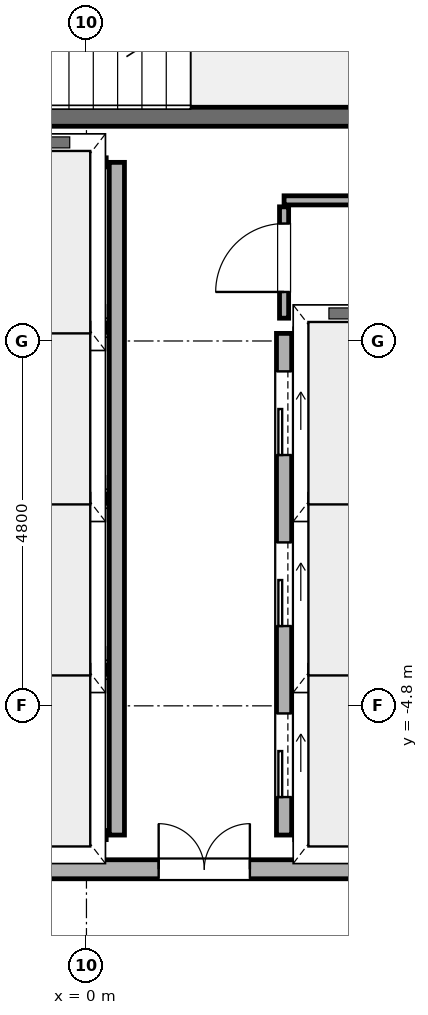
"""IFC4 building model, lengths in metres.
Left out: names, types, materials, properties, quantities, classifications, styles, units other than length and angle.
Written with IfcOpenShell. Run it as: python <this file> out.ifc"""

import sys

from ifc_helpers import new_model, si_unit, direction, frame, frame_2d, origin, place, context, subcontext, project, spatial, rectangle, extrude, element, fill, save


model = new_model("IFC4")
c1 = context("Model", 3, precision=1e-05, world=origin(), true_north=direction((0.0, 1.0)))
c2 = subcontext(c1, "Body", "Model", "MODEL_VIEW")
j1 = project(units=[si_unit("LENGTHUNIT", "METRE"), si_unit("PLANEANGLEUNIT", "RADIAN")], contexts=[c1])
p1 = place(None, origin())
s1 = spatial("IfcSite", under=j1, at=p1, CompositionType="ELEMENT")
p2 = place(p1, origin())
s2 = spatial("IfcBuilding", under=s1, at=p2, CompositionType="ELEMENT")
p3 = place(p2, frame((0.0, 0.0, 180.3)))
s3 = spatial("IfcBuildingStorey", under=s2, at=p3, CompositionType="ELEMENT", Elevation=180.3)
p4 = place(p3, frame((-4.6, -6.95, 0.0), z_axis=(0.0, 0.0, 1.0), x_axis=(1.0, 0.0, 0.0)))
e1 = element("IfcWall", 1, at=p4, inside=s3, PredefinedType="SOLIDWALL", context=c2, shape_type="SweptSolid", body=[
    extrude(rectangle(XDim=9.2, YDim=0.25, at=frame_2d((4.6, 0.0))), origin(), (0.0, 0.0, 1.0), 3.75),
])
p5 = place(p4, frame((0.8, 0.0, 0.0)))
e2 = element("IfcOpeningElement", 2, at=p5, cuts=e1, PredefinedType="OPENING", context=c2, shape_type="SweptSolid", body=[
    extrude(rectangle(XDim=1.2, YDim=2.2, at=frame_2d((0.6, 1.1))), frame((0.0, 0.14, 0.0), z_axis=(0.0, -1.0, 0.0), x_axis=(1.0, 0.0, 0.0)), (0.0, 0.0, 1.0), 0.28),
])
p6 = place(p4, frame((5.55, 0.0, 0.0)))
e3 = element("IfcOpeningElement", 3, at=p6, cuts=e1, PredefinedType="OPENING", context=c2, shape_type="SweptSolid", body=[
    extrude(rectangle(XDim=1.2, YDim=2.2, at=frame_2d((0.6, 1.1))), frame((0.0, 0.14, 0.0), z_axis=(0.0, -1.0, 0.0), x_axis=(1.0, 0.0, 0.0)), (0.0, 0.0, 1.0), 0.28),
])
p7 = place(p3, frame((-4.65, 2.95, -0.22), z_axis=(0.0, 0.0, 1.0), x_axis=(1.0, 0.0, 0.0)))
e4 = element("IfcWall", 4, at=p7, inside=s3, PredefinedType="SOLIDWALL", context=c2, shape_type="SweptSolid", body=[
    extrude(rectangle(XDim=9.9, YDim=0.25, at=frame_2d((4.95, 0.0))), origin(), (0.0, 0.0, 1.0), 5.17),
])
p8 = place(p7, frame((0.65, 0.0, 0.22)))
e5 = element("IfcOpeningElement", 5, at=p8, cuts=e4, PredefinedType="OPENING", context=c2, shape_type="SweptSolid", body=[
    extrude(rectangle(XDim=0.95, YDim=2.15, at=frame_2d((0.475, 1.075))), frame((0.0, 0.14, 0.0), z_axis=(0.0, -1.0, 0.0), x_axis=(1.0, 0.0, 0.0)), (0.0, 0.0, 1.0), 0.28),
])
p9 = place(p3, frame((0.4, -6.5, 0.0), z_axis=(0.0, 0.0, 1.0), x_axis=(0.0, 1.0, 0.0)))
e6 = element("IfcWall", 6, at=p9, inside=s3, PredefinedType="SOLIDWALL", context=c2, shape_type="SweptSolid", body=[
    extrude(rectangle(XDim=8.85, YDim=0.2, at=frame_2d((4.425, 0.0))), origin(), (0.0, 0.0, 1.0), 4.95),
])
for number, where, z_axis, x_axis in (
    (7, (-1.96, -6.5, 0.0), (0.0, 0.0, 1.0), (1.0, 0.0, 0.0)),
    (8, (-1.96, -4.325, 0.0), (0.0, 0.0, 1.0), (1.0, 0.0, 0.0)),
    (9, (-1.96, -2.075, 0.0), (0.0, 0.0, 1.0), (1.0, 0.0, 0.0)),
    (10, (-1.96, 0.175, 0.0), (0.0, 0.0, 1.0), (1.0, 0.0, 0.0)),
    (11, (-1.96, 2.35, 0.0), (0.0, 0.0, 1.0), (1.0, 0.0, 0.0)),
):
    element("IfcWall", number, at=place(p3, frame(where, z_axis=z_axis, x_axis=x_axis)), inside=s3, PredefinedType="PARTITIONING", context=c2, shape_type="SweptSolid", body=[
        extrude(rectangle(XDim=2.22, YDim=0.12, at=frame_2d((1.11, 0.0))), origin(), (0.0, 0.0, 1.0), 4.95),
    ])
p10 = place(p3, frame((2.6, -6.5, 0.0), z_axis=(0.0, 0.0, 1.0), x_axis=(0.0, 1.0, 0.0)))
e12 = element("IfcWall", 12, at=p10, inside=s3, PredefinedType="SOLIDWALL", context=c2, shape_type="SweptSolid", body=[
    extrude(rectangle(XDim=6.6, YDim=0.2, at=frame_2d((3.3, 0.0))), origin(), (0.0, 0.0, 1.0), 4.95),
])
p11 = place(p10, frame((0.5, 0.0, 0.0)))
e13 = element("IfcOpeningElement", 13, at=p11, cuts=e12, PredefinedType="OPENING", context=c2, shape_type="SweptSolid", body=[
    extrude(rectangle(XDim=1.1, YDim=2.2, at=frame_2d((0.55, 1.1))), frame((0.0, 0.115, 0.0), z_axis=(0.0, -1.0, 0.0), x_axis=(1.0, 0.0, 0.0)), (0.0, 0.0, 1.0), 0.23),
])
p12 = place(p10, frame((2.75, 0.0, 0.0)))
e14 = element("IfcOpeningElement", 14, at=p12, cuts=e12, PredefinedType="OPENING", context=c2, shape_type="SweptSolid", body=[
    extrude(rectangle(XDim=1.1, YDim=2.2, at=frame_2d((0.55, 1.1))), frame((0.0, 0.115, 0.0), z_axis=(0.0, -1.0, 0.0), x_axis=(1.0, 0.0, 0.0)), (0.0, 0.0, 1.0), 0.23),
])
p13 = place(p10, frame((5.0, 0.0, 0.0)))
e15 = element("IfcOpeningElement", 15, at=p13, cuts=e12, PredefinedType="OPENING", context=c2, shape_type="SweptSolid", body=[
    extrude(rectangle(XDim=1.1, YDim=2.2, at=frame_2d((0.55, 1.1))), frame((0.0, 0.115, 0.0), z_axis=(0.0, -1.0, 0.0), x_axis=(1.0, 0.0, 0.0)), (0.0, 0.0, 1.0), 0.23),
])
for number, where, z_axis, x_axis in (
    (16, (2.74, -6.5, 0.0), (0.0, 0.0, 1.0), (1.0, 0.0, 0.0)),
    (17, (2.74, -4.325, 0.0), (0.0, 0.0, 1.0), (1.0, 0.0, 0.0)),
    (18, (2.74, -2.075, 0.0), (0.0, 0.0, 1.0), (1.0, 0.0, 0.0)),
    (19, (2.74, 0.1, 0.0), (0.0, 0.0, 1.0), (1.0, 0.0, 0.0)),
):
    element("IfcWall", number, at=place(p3, frame(where, z_axis=z_axis, x_axis=x_axis)), inside=s3, PredefinedType="PARTITIONING", context=c2, shape_type="SweptSolid", body=[
        extrude(rectangle(XDim=2.17, YDim=0.12, at=frame_2d((1.085, 0.0))), origin(), (0.0, 0.0, 1.0), 4.95),
    ])
p14 = place(p3, frame((2.6, 1.85, 0.0), z_axis=(0.0, 0.0, 1.0), x_axis=(1.0, 0.0, 0.0)))
e20 = element("IfcWall", 20, at=p14, inside=s3, PredefinedType="PARTITIONING", context=c2, shape_type="SweptSolid", body=[
    extrude(rectangle(XDim=2.45, YDim=0.12, at=frame_2d((1.225, 0.0))), origin(), (0.0, 0.0, 1.0), 4.95),
])
p15 = place(p3, frame((2.6, 0.3, 0.0), z_axis=(0.0, 0.0, 1.0), x_axis=(0.0, 1.0, 0.0)))
e21 = element("IfcWall", 21, at=p15, inside=s3, PredefinedType="PARTITIONING", context=c2, shape_type="SweptSolid", body=[
    extrude(rectangle(XDim=1.465, YDim=0.12, at=frame_2d((0.732, 0.0))), origin(), (0.0, 0.0, 1.0), 4.95),
])
p16 = place(p15, frame((0.345, 0.0, 0.0)))
e22 = element("IfcOpeningElement", 22, at=p16, cuts=e21, PredefinedType="OPENING", context=c2, shape_type="SweptSolid", body=[
    extrude(rectangle(XDim=0.9, YDim=2.1, at=frame_2d((0.45, 1.05))), frame((0.0, 0.075, 0.0), z_axis=(0.0, -1.0, 0.0), x_axis=(1.0, 0.0, 0.0)), (0.0, 0.0, 1.0), 0.15),
])
p17 = place(p6, origin())
e23 = element("IfcDoor", 23, at=p17, inside=s3, OperationType="DOUBLE_DOOR_SINGLE_SWING", PredefinedType="DOOR", context=c2, shape_type="SweptSolid", body=[
    extrude(rectangle(XDim=1.2, YDim=2.2, at=frame_2d((0.6, 1.1))), frame((0.0, 0.025, 0.0), z_axis=(0.0, -1.0, 0.0), x_axis=(1.0, 0.0, 0.0)), (0.0, 0.0, 1.0), 0.05),
])
fill(e3, e23)
p18 = place(p11, origin())
e24 = element("IfcDoor", 24, at=p18, inside=s3, OperationType="SLIDING_TO_LEFT", PredefinedType="DOOR", context=c2, shape_type="SweptSolid", body=[
    extrude(rectangle(XDim=1.1, YDim=2.2, at=frame_2d((0.55, 1.1))), frame((0.0, 0.025, 0.0), z_axis=(0.0, -1.0, 0.0), x_axis=(1.0, 0.0, 0.0)), (0.0, 0.0, 1.0), 0.05),
])
fill(e13, e24)
p19 = place(p12, origin())
e25 = element("IfcDoor", 25, at=p19, inside=s3, OperationType="SLIDING_TO_LEFT", PredefinedType="DOOR", context=c2, shape_type="SweptSolid", body=[
    extrude(rectangle(XDim=1.1, YDim=2.2, at=frame_2d((0.55, 1.1))), frame((0.0, 0.025, 0.0), z_axis=(0.0, -1.0, 0.0), x_axis=(1.0, 0.0, 0.0)), (0.0, 0.0, 1.0), 0.05),
])
fill(e14, e25)
p20 = place(p13, origin())
e26 = element("IfcDoor", 26, at=p20, inside=s3, OperationType="SLIDING_TO_LEFT", PredefinedType="DOOR", context=c2, shape_type="SweptSolid", body=[
    extrude(rectangle(XDim=1.1, YDim=2.2, at=frame_2d((0.55, 1.1))), frame((0.0, 0.025, 0.0), z_axis=(0.0, -1.0, 0.0), x_axis=(1.0, 0.0, 0.0)), (0.0, 0.0, 1.0), 0.05),
])
fill(e15, e26)
p21 = place(p16, origin())
e27 = element("IfcDoor", 27, at=p21, inside=s3, OperationType="SINGLE_SWING_RIGHT", PredefinedType="DOOR", context=c2, shape_type="SweptSolid", body=[
    extrude(rectangle(XDim=0.9, YDim=2.1, at=frame_2d((0.45, 1.05))), frame((0.0, 0.025, 0.0), z_axis=(0.0, -1.0, 0.0), x_axis=(1.0, 0.0, 0.0)), (0.0, 0.0, 1.0), 0.05),
])
fill(e22, e27)
save(model, sys.argv[1])
